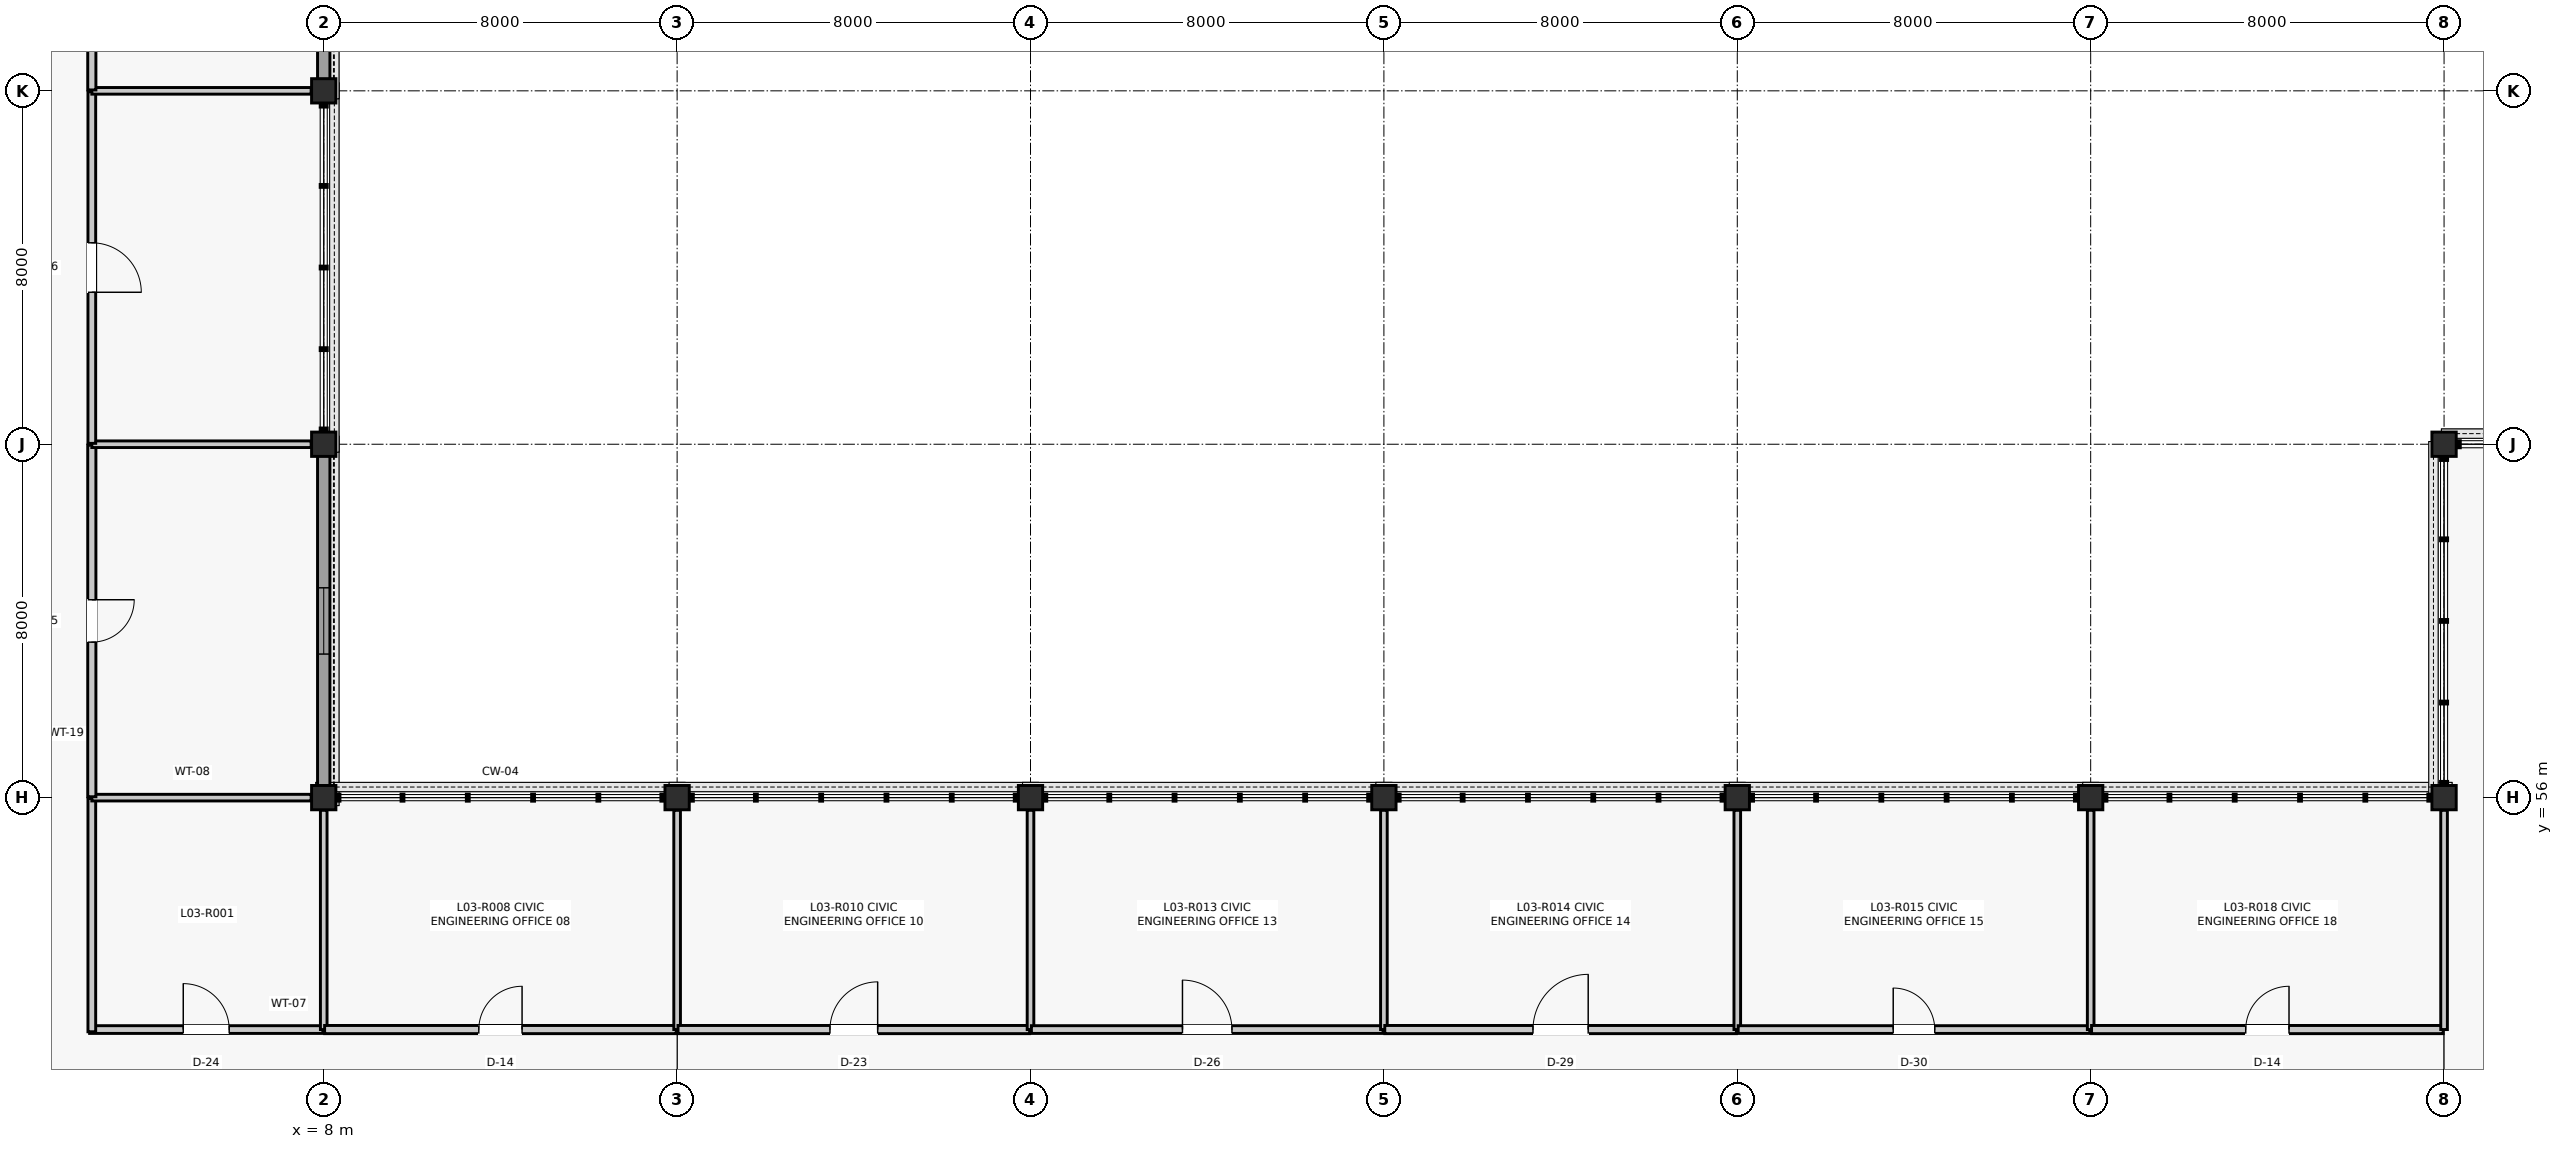
"""IFC4 building model, lengths in metres.
Left out: names, types, materials, properties, quantities, classifications, styles, units other than length and angle.
Written with IfcOpenShell. Run it as: python <this file> out.ifc"""

import sys

from ifc_helpers import new_model, si_unit, direction, frame, frame_2d, origin, origin_2d, place, context, subcontext, project, spatial, rectangle, extrude, element, fill, save


model = new_model("IFC4")
c1 = context("Model", 3, precision=1e-05, world=origin(), true_north=direction((0.0, 1.0)))
c2 = subcontext(c1, "Body", "Model", "MODEL_VIEW")
j1 = project(units=[si_unit("LENGTHUNIT", "METRE"), si_unit("PLANEANGLEUNIT", "RADIAN")], contexts=[c1])
p1 = place(None, origin())
s1 = spatial("IfcSite", under=j1, at=p1, CompositionType="ELEMENT")
p2 = place(p1, origin())
s2 = spatial("IfcBuilding", under=s1, at=p2, CompositionType="ELEMENT")
p3 = place(p2, frame((0.0, 0.0, 13.86)))
s3 = spatial("IfcBuildingStorey", under=s2, at=p3, CompositionType="ELEMENT", Elevation=13.86)
for number, where, z_axis, x_axis in (
    (1, (8.0, 56.0, 0.0), (0.0, 0.0, 1.0), (1.0, 0.0, 0.0)),
    (2, (8.0, 64.0, 0.0), (0.0, 0.0, 1.0), (1.0, 0.0, 0.0)),
    (3, (8.0, 72.0, 0.0), (0.0, 0.0, 1.0), (1.0, 0.0, 0.0)),
    (4, (16.0, 56.0, 0.0), (0.0, 0.0, 1.0), (1.0, 0.0, 0.0)),
    (5, (24.0, 56.0, 0.0), (0.0, 0.0, 1.0), (1.0, 0.0, 0.0)),
    (6, (32.0, 56.0, 0.0), (0.0, 0.0, 1.0), (1.0, 0.0, 0.0)),
    (7, (40.0, 56.0, 0.0), (0.0, 0.0, 1.0), (1.0, 0.0, 0.0)),
    (8, (48.0, 56.0, 0.0), (0.0, 0.0, 1.0), (1.0, 0.0, 0.0)),
    (9, (56.0, 56.0, 0.0), (0.0, 0.0, 1.0), (1.0, 0.0, 0.0)),
    (10, (56.0, 64.0, 0.0), (0.0, 0.0, 1.0), (1.0, 0.0, 0.0)),
):
    element("IfcColumn", number, at=place(p3, frame(where, z_axis=z_axis, x_axis=x_axis)), inside=s3, PredefinedType="COLUMN", context=c2, shape_type="SweptSolid", body=[
        extrude(rectangle(XDim=0.55, YDim=0.55, at=origin_2d()), origin(), (0.0, 0.0, 1.0), 3.96),
    ])
p4 = place(p3, frame((8.0, 56.26, 0.0), z_axis=(0.0, 0.0, 1.0), x_axis=(0.0, 1.0, 0.0)))
e11 = element("IfcWall", 11, at=p4, inside=s3, PredefinedType="SOLIDWALL", context=c2, shape_type="SweptSolid", body=[
    extrude(rectangle(XDim=7.48, YDim=0.28, at=frame_2d((3.74, 0.0))), origin(), (0.0, 0.0, 1.0), 3.367),
])
p5 = place(p4, frame((2.99, 0.0, 0.9)))
e12 = element("IfcOpeningElement", 12, at=p5, cuts=e11, PredefinedType="OPENING", context=c2, shape_type="SweptSolid", body=[
    extrude(rectangle(XDim=1.5, YDim=1.9, at=frame_2d((0.75, 0.95))), frame((0.0, 0.15, 0.0), z_axis=(0.0, -1.0, 0.0), x_axis=(1.0, 0.0, 0.0)), (0.0, 0.0, 1.0), 0.3),
])
p6 = place(p3, frame((8.0, 72.26, 0.0), z_axis=(0.0, 0.0, 1.0), x_axis=(0.0, 1.0, 0.0)))
e13 = element("IfcWall", 13, at=p6, inside=s3, PredefinedType="SOLIDWALL", context=c2, shape_type="SweptSolid", body=[
    extrude(rectangle(XDim=7.43, YDim=0.28, at=frame_2d((3.715, 0.0))), origin(), (0.0, 0.0, 1.0), 3.364),
])
p7 = place(p6, frame((3.115, 0.0, 0.9)))
e14 = element("IfcOpeningElement", 14, at=p7, cuts=e13, PredefinedType="OPENING", context=c2, shape_type="SweptSolid", body=[
    extrude(rectangle(XDim=1.2, YDim=1.8, at=frame_2d((0.6, 0.9))), frame((0.0, 0.15, 0.0), z_axis=(0.0, -1.0, 0.0), x_axis=(1.0, 0.0, 0.0)), (0.0, 0.0, 1.0), 0.3),
])
p8 = place(p3, frame((2.7, 50.75, 0.0), z_axis=(0.0, 0.0, 1.0), x_axis=(1.0, 0.0, 0.0)))
e15 = element("IfcWall", 15, at=p8, inside=s3, PredefinedType="PARTITIONING", context=c2, shape_type="SweptSolid", body=[
    extrude(rectangle(XDim=5.28, YDim=0.175, at=frame_2d((2.64, 0.0))), origin(), (0.0, 0.0, 1.0), 3.253),
])
p9 = place(p8, frame((2.12, 0.0, 0.0)))
e16 = element("IfcOpeningElement", 16, at=p9, cuts=e15, PredefinedType="OPENING", context=c2, shape_type="SweptSolid", body=[
    extrude(rectangle(XDim=1.04, YDim=2.18, at=frame_2d((0.52, 1.09))), frame((0.0, 0.097, 0.0), z_axis=(0.0, -1.0, 0.0), x_axis=(1.0, 0.0, 0.0)), (0.0, 0.0, 1.0), 0.195),
])
p10 = place(p3, frame((2.75, 50.7, 0.0), z_axis=(0.0, 0.0, 1.0), x_axis=(0.0, 1.0, 0.0)))
e17 = element("IfcWall", 17, at=p10, inside=s3, PredefinedType="PARTITIONING", context=c2, shape_type="SweptSolid", body=[
    extrude(rectangle(XDim=5.28, YDim=0.175, at=frame_2d((2.64, 0.0))), origin(), (0.0, 0.0, 1.0), 3.392),
])
p11 = place(p3, frame((2.75, 56.0, 0.0), z_axis=(0.0, 0.0, 1.0), x_axis=(1.0, 0.0, 0.0)))
e18 = element("IfcWall", 18, at=p11, inside=s3, PredefinedType="PARTITIONING", context=c2, shape_type="SweptSolid", body=[
    extrude(rectangle(XDim=4.965, YDim=0.15, at=frame_2d((2.482, 0.0))), origin(), (0.0, 0.0, 1.0), 3.452),
])
p12 = place(p3, frame((8.0, 50.75, 0.0), z_axis=(0.0, 0.0, 1.0), x_axis=(0.0, 1.0, 0.0)))
e19 = element("IfcWall", 19, at=p12, inside=s3, PredefinedType="PARTITIONING", context=c2, shape_type="SweptSolid", body=[
    extrude(rectangle(XDim=4.965, YDim=0.15, at=frame_2d((2.482, 0.0))), origin(), (0.0, 0.0, 1.0), 3.253),
])
p13 = place(p3, frame((2.75, 56.02, 0.0), z_axis=(0.0, 0.0, 1.0), x_axis=(0.0, 1.0, 0.0)))
e20 = element("IfcWall", 20, at=p13, inside=s3, PredefinedType="PARTITIONING", context=c2, shape_type="SweptSolid", body=[
    extrude(rectangle(XDim=7.96, YDim=0.185, at=frame_2d((3.98, 0.0))), origin(), (0.0, 0.0, 1.0), 3.247),
])
p14 = place(p13, frame((3.5, 0.0, 0.0)))
e21 = element("IfcOpeningElement", 21, at=p14, cuts=e20, PredefinedType="OPENING", context=c2, shape_type="SweptSolid", body=[
    extrude(rectangle(XDim=0.96, YDim=2.14, at=frame_2d((0.48, 1.07))), frame((0.0, 0.103, 0.0), z_axis=(0.0, -1.0, 0.0), x_axis=(1.0, 0.0, 0.0)), (0.0, 0.0, 1.0), 0.205),
])
p15 = place(p3, frame((2.75, 64.0, 0.0), z_axis=(0.0, 0.0, 1.0), x_axis=(1.0, 0.0, 0.0)))
e22 = element("IfcWall", 22, at=p15, inside=s3, PredefinedType="PARTITIONING", context=c2, shape_type="SweptSolid", body=[
    extrude(rectangle(XDim=4.965, YDim=0.15, at=frame_2d((2.482, 0.0))), origin(), (0.0, 0.0, 1.0), 3.247),
])
p16 = place(p3, frame((2.75, 64.02, 0.0), z_axis=(0.0, 0.0, 1.0), x_axis=(0.0, 1.0, 0.0)))
e23 = element("IfcWall", 23, at=p16, inside=s3, PredefinedType="PARTITIONING", context=c2, shape_type="SweptSolid", body=[
    extrude(rectangle(XDim=7.96, YDim=0.175, at=frame_2d((3.98, 0.0))), origin(), (0.0, 0.0, 1.0), 3.247),
])
p17 = place(p16, frame((3.42, 0.0, 0.0)))
e24 = element("IfcOpeningElement", 24, at=p17, cuts=e23, PredefinedType="OPENING", context=c2, shape_type="SweptSolid", body=[
    extrude(rectangle(XDim=1.12, YDim=2.22, at=frame_2d((0.56, 1.11))), frame((0.0, 0.097, 0.0), z_axis=(0.0, -1.0, 0.0), x_axis=(1.0, 0.0, 0.0)), (0.0, 0.0, 1.0), 0.195),
])
p18 = place(p3, frame((2.75, 72.0, 0.0), z_axis=(0.0, 0.0, 1.0), x_axis=(1.0, 0.0, 0.0)))
e25 = element("IfcWall", 25, at=p18, inside=s3, PredefinedType="PARTITIONING", context=c2, shape_type="SweptSolid", body=[
    extrude(rectangle(XDim=4.965, YDim=0.15, at=frame_2d((2.482, 0.0))), origin(), (0.0, 0.0, 1.0), 3.253),
])
p19 = place(p3, frame((2.75, 72.02, 0.0), z_axis=(0.0, 0.0, 1.0), x_axis=(0.0, 1.0, 0.0)))
e26 = element("IfcWall", 26, at=p19, inside=s3, PredefinedType="PARTITIONING", context=c2, shape_type="SweptSolid", body=[
    extrude(rectangle(XDim=7.96, YDim=0.185, at=frame_2d((3.98, 0.0))), origin(), (0.0, 0.0, 1.0), 3.241),
])
p20 = place(p19, frame((3.355, 0.0, 0.0)))
e27 = element("IfcOpeningElement", 27, at=p20, cuts=e26, PredefinedType="OPENING", context=c2, shape_type="SweptSolid", body=[
    extrude(rectangle(XDim=1.25, YDim=2.18, at=frame_2d((0.625, 1.09))), frame((0.0, 0.103, 0.0), z_axis=(0.0, -1.0, 0.0), x_axis=(1.0, 0.0, 0.0)), (0.0, 0.0, 1.0), 0.205),
])
p21 = place(p3, frame((8.02, 50.75, 0.0), z_axis=(0.0, 0.0, 1.0), x_axis=(1.0, 0.0, 0.0)))
e28 = element("IfcWall", 28, at=p21, inside=s3, PredefinedType="PARTITIONING", context=c2, shape_type="SweptSolid", body=[
    extrude(rectangle(XDim=7.96, YDim=0.185, at=frame_2d((3.98, 0.0))), origin(), (0.0, 0.0, 1.0), 3.253),
])
p22 = place(p21, frame((3.49, 0.0, 0.0)))
e29 = element("IfcOpeningElement", 29, at=p22, cuts=e28, PredefinedType="OPENING", context=c2, shape_type="SweptSolid", body=[
    extrude(rectangle(XDim=0.98, YDim=2.15, at=frame_2d((0.49, 1.075))), frame((0.0, 0.103, 0.0), z_axis=(0.0, -1.0, 0.0), x_axis=(1.0, 0.0, 0.0)), (0.0, 0.0, 1.0), 0.205),
])
p23 = place(p3, frame((16.0, 50.75, 0.0), z_axis=(0.0, 0.0, 1.0), x_axis=(0.0, 1.0, 0.0)))
e30 = element("IfcWall", 30, at=p23, inside=s3, PredefinedType="PARTITIONING", context=c2, shape_type="SweptSolid", body=[
    extrude(rectangle(XDim=4.965, YDim=0.15, at=frame_2d((2.482, 0.0))), origin(), (0.0, 0.0, 1.0), 3.452),
])
p24 = place(p3, frame((16.02, 50.75, 0.0), z_axis=(0.0, 0.0, 1.0), x_axis=(1.0, 0.0, 0.0)))
e31 = element("IfcWall", 31, at=p24, inside=s3, PredefinedType="PARTITIONING", context=c2, shape_type="SweptSolid", body=[
    extrude(rectangle(XDim=7.96, YDim=0.185, at=frame_2d((3.98, 0.0))), origin(), (0.0, 0.0, 1.0), 3.247),
])
p25 = place(p24, frame((3.44, 0.0, 0.0)))
e32 = element("IfcOpeningElement", 32, at=p25, cuts=e31, PredefinedType="OPENING", context=c2, shape_type="SweptSolid", body=[
    extrude(rectangle(XDim=1.08, YDim=2.2, at=frame_2d((0.54, 1.1))), frame((0.0, 0.103, 0.0), z_axis=(0.0, -1.0, 0.0), x_axis=(1.0, 0.0, 0.0)), (0.0, 0.0, 1.0), 0.205),
])
p26 = place(p3, frame((24.0, 50.75, 0.0), z_axis=(0.0, 0.0, 1.0), x_axis=(0.0, 1.0, 0.0)))
e33 = element("IfcWall", 33, at=p26, inside=s3, PredefinedType="PARTITIONING", context=c2, shape_type="SweptSolid", body=[
    extrude(rectangle(XDim=4.965, YDim=0.15, at=frame_2d((2.482, 0.0))), origin(), (0.0, 0.0, 1.0), 3.247),
])
p27 = place(p3, frame((24.02, 50.75, 0.0), z_axis=(0.0, 0.0, 1.0), x_axis=(1.0, 0.0, 0.0)))
e34 = element("IfcWall", 34, at=p27, inside=s3, PredefinedType="PARTITIONING", context=c2, shape_type="SweptSolid", body=[
    extrude(rectangle(XDim=7.96, YDim=0.175, at=frame_2d((3.98, 0.0))), origin(), (0.0, 0.0, 1.0), 3.247),
])
p28 = place(p27, frame((3.42, 0.0, 0.0)))
e35 = element("IfcOpeningElement", 35, at=p28, cuts=e34, PredefinedType="OPENING", context=c2, shape_type="SweptSolid", body=[
    extrude(rectangle(XDim=1.12, YDim=2.22, at=frame_2d((0.56, 1.11))), frame((0.0, 0.097, 0.0), z_axis=(0.0, -1.0, 0.0), x_axis=(1.0, 0.0, 0.0)), (0.0, 0.0, 1.0), 0.195),
])
p29 = place(p3, frame((32.0, 50.75, 0.0), z_axis=(0.0, 0.0, 1.0), x_axis=(0.0, 1.0, 0.0)))
e36 = element("IfcWall", 36, at=p29, inside=s3, PredefinedType="PARTITIONING", context=c2, shape_type="SweptSolid", body=[
    extrude(rectangle(XDim=4.965, YDim=0.15, at=frame_2d((2.482, 0.0))), origin(), (0.0, 0.0, 1.0), 3.253),
])
p30 = place(p3, frame((32.02, 50.75, 0.0), z_axis=(0.0, 0.0, 1.0), x_axis=(1.0, 0.0, 0.0)))
e37 = element("IfcWall", 37, at=p30, inside=s3, PredefinedType="PARTITIONING", context=c2, shape_type="SweptSolid", body=[
    extrude(rectangle(XDim=7.96, YDim=0.185, at=frame_2d((3.98, 0.0))), origin(), (0.0, 0.0, 1.0), 3.253),
])
p31 = place(p30, frame((3.355, 0.0, 0.0)))
e38 = element("IfcOpeningElement", 38, at=p31, cuts=e37, PredefinedType="OPENING", context=c2, shape_type="SweptSolid", body=[
    extrude(rectangle(XDim=1.25, YDim=2.18, at=frame_2d((0.625, 1.09))), frame((0.0, 0.103, 0.0), z_axis=(0.0, -1.0, 0.0), x_axis=(1.0, 0.0, 0.0)), (0.0, 0.0, 1.0), 0.205),
])
p32 = place(p3, frame((40.0, 50.75, 0.0), z_axis=(0.0, 0.0, 1.0), x_axis=(0.0, 1.0, 0.0)))
e39 = element("IfcWall", 39, at=p32, inside=s3, PredefinedType="PARTITIONING", context=c2, shape_type="SweptSolid", body=[
    extrude(rectangle(XDim=4.965, YDim=0.15, at=frame_2d((2.482, 0.0))), origin(), (0.0, 0.0, 1.0), 3.452),
])
p33 = place(p3, frame((40.02, 50.75, 0.0), z_axis=(0.0, 0.0, 1.0), x_axis=(1.0, 0.0, 0.0)))
e40 = element("IfcWall", 40, at=p33, inside=s3, PredefinedType="PARTITIONING", context=c2, shape_type="SweptSolid", body=[
    extrude(rectangle(XDim=7.96, YDim=0.175, at=frame_2d((3.98, 0.0))), origin(), (0.0, 0.0, 1.0), 3.247),
])
p34 = place(p33, frame((3.51, 0.0, 0.0)))
e41 = element("IfcOpeningElement", 41, at=p34, cuts=e40, PredefinedType="OPENING", context=c2, shape_type="SweptSolid", body=[
    extrude(rectangle(XDim=0.94, YDim=2.12, at=frame_2d((0.47, 1.06))), frame((0.0, 0.097, 0.0), z_axis=(0.0, -1.0, 0.0), x_axis=(1.0, 0.0, 0.0)), (0.0, 0.0, 1.0), 0.195),
])
p35 = place(p3, frame((48.0, 50.75, 0.0), z_axis=(0.0, 0.0, 1.0), x_axis=(0.0, 1.0, 0.0)))
e42 = element("IfcWall", 42, at=p35, inside=s3, PredefinedType="PARTITIONING", context=c2, shape_type="SweptSolid", body=[
    extrude(rectangle(XDim=4.965, YDim=0.15, at=frame_2d((2.482, 0.0))), origin(), (0.0, 0.0, 1.0), 3.247),
])
p36 = place(p3, frame((48.02, 50.75, 0.0), z_axis=(0.0, 0.0, 1.0), x_axis=(1.0, 0.0, 0.0)))
e43 = element("IfcWall", 43, at=p36, inside=s3, PredefinedType="PARTITIONING", context=c2, shape_type="SweptSolid", body=[
    extrude(rectangle(XDim=7.96, YDim=0.185, at=frame_2d((3.98, 0.0))), origin(), (0.0, 0.0, 1.0), 3.247),
])
p37 = place(p36, frame((3.49, 0.0, 0.0)))
e44 = element("IfcOpeningElement", 44, at=p37, cuts=e43, PredefinedType="OPENING", context=c2, shape_type="SweptSolid", body=[
    extrude(rectangle(XDim=0.98, YDim=2.15, at=frame_2d((0.49, 1.075))), frame((0.0, 0.103, 0.0), z_axis=(0.0, -1.0, 0.0), x_axis=(1.0, 0.0, 0.0)), (0.0, 0.0, 1.0), 0.205),
])
p38 = place(p3, frame((56.0, 50.75, 0.0), z_axis=(0.0, 0.0, 1.0), x_axis=(0.0, 1.0, 0.0)))
e45 = element("IfcWall", 45, at=p38, inside=s3, PredefinedType="PARTITIONING", context=c2, shape_type="SweptSolid", body=[
    extrude(rectangle(XDim=4.965, YDim=0.15, at=frame_2d((2.482, 0.0))), origin(), (0.0, 0.0, 1.0), 3.253),
])
p39 = place(p5, origin())
e46 = element("IfcWindow", 46, at=p39, inside=s3, PartitioningType="SINGLE_PANEL", PredefinedType="WINDOW", context=c2, shape_type="SweptSolid", body=[
    extrude(rectangle(XDim=1.5, YDim=1.9, at=frame_2d((0.75, 0.95))), frame((0.0, 0.03, 0.0), z_axis=(0.0, -1.0, 0.0), x_axis=(1.0, 0.0, 0.0)), (0.0, 0.0, 1.0), 0.06),
])
fill(e12, e46)
p40 = place(p9, origin())
e47 = element("IfcDoor", 47, at=p40, inside=s3, OperationType="SINGLE_SWING_LEFT", PredefinedType="DOOR", context=c2, shape_type="SweptSolid", body=[
    extrude(rectangle(XDim=1.04, YDim=2.18, at=frame_2d((0.52, 1.09))), frame((0.0, 0.025, 0.0), z_axis=(0.0, -1.0, 0.0), x_axis=(1.0, 0.0, 0.0)), (0.0, 0.0, 1.0), 0.05),
])
fill(e16, e47)
p41 = place(p14, frame((0.96, 0.0, 0.0), z_axis=(0.0, 0.0, 1.0), x_axis=(-1.0, 0.0, 0.0)))
e48 = element("IfcDoor", 48, at=p41, inside=s3, OperationType="SINGLE_SWING_RIGHT", PredefinedType="DOOR", context=c2, shape_type="SweptSolid", body=[
    extrude(rectangle(XDim=0.96, YDim=2.14, at=frame_2d((0.48, 1.07))), frame((0.0, 0.025, 0.0), z_axis=(0.0, -1.0, 0.0), x_axis=(1.0, 0.0, 0.0)), (0.0, 0.0, 1.0), 0.05),
])
fill(e21, e48)
p42 = place(p17, frame((1.12, 0.0, 0.0), z_axis=(0.0, 0.0, 1.0), x_axis=(-1.0, 0.0, 0.0)))
e49 = element("IfcDoor", 49, at=p42, inside=s3, OperationType="SINGLE_SWING_LEFT", PredefinedType="DOOR", context=c2, shape_type="SweptSolid", body=[
    extrude(rectangle(XDim=1.12, YDim=2.22, at=frame_2d((0.56, 1.11))), frame((0.0, 0.025, 0.0), z_axis=(0.0, -1.0, 0.0), x_axis=(1.0, 0.0, 0.0)), (0.0, 0.0, 1.0), 0.05),
])
fill(e24, e49)
p43 = place(p22, origin())
e50 = element("IfcDoor", 50, at=p43, inside=s3, OperationType="SINGLE_SWING_RIGHT", PredefinedType="DOOR", context=c2, shape_type="SweptSolid", body=[
    extrude(rectangle(XDim=0.98, YDim=2.15, at=frame_2d((0.49, 1.075))), frame((0.0, 0.025, 0.0), z_axis=(0.0, -1.0, 0.0), x_axis=(1.0, 0.0, 0.0)), (0.0, 0.0, 1.0), 0.05),
])
fill(e29, e50)
p44 = place(p25, origin())
e51 = element("IfcDoor", 51, at=p44, inside=s3, OperationType="SINGLE_SWING_RIGHT", PredefinedType="DOOR", context=c2, shape_type="SweptSolid", body=[
    extrude(rectangle(XDim=1.08, YDim=2.2, at=frame_2d((0.54, 1.1))), frame((0.0, 0.025, 0.0), z_axis=(0.0, -1.0, 0.0), x_axis=(1.0, 0.0, 0.0)), (0.0, 0.0, 1.0), 0.05),
])
fill(e32, e51)
p45 = place(p28, origin())
e52 = element("IfcDoor", 52, at=p45, inside=s3, OperationType="SINGLE_SWING_LEFT", PredefinedType="DOOR", context=c2, shape_type="SweptSolid", body=[
    extrude(rectangle(XDim=1.12, YDim=2.22, at=frame_2d((0.56, 1.11))), frame((0.0, 0.025, 0.0), z_axis=(0.0, -1.0, 0.0), x_axis=(1.0, 0.0, 0.0)), (0.0, 0.0, 1.0), 0.05),
])
fill(e35, e52)
p46 = place(p31, origin())
e53 = element("IfcDoor", 53, at=p46, inside=s3, OperationType="SINGLE_SWING_RIGHT", PredefinedType="DOOR", context=c2, shape_type="SweptSolid", body=[
    extrude(rectangle(XDim=1.25, YDim=2.18, at=frame_2d((0.625, 1.09))), frame((0.0, 0.025, 0.0), z_axis=(0.0, -1.0, 0.0), x_axis=(1.0, 0.0, 0.0)), (0.0, 0.0, 1.0), 0.05),
])
fill(e38, e53)
p47 = place(p34, origin())
e54 = element("IfcDoor", 54, at=p47, inside=s3, OperationType="SINGLE_SWING_LEFT", PredefinedType="DOOR", context=c2, shape_type="SweptSolid", body=[
    extrude(rectangle(XDim=0.94, YDim=2.12, at=frame_2d((0.47, 1.06))), frame((0.0, 0.025, 0.0), z_axis=(0.0, -1.0, 0.0), x_axis=(1.0, 0.0, 0.0)), (0.0, 0.0, 1.0), 0.05),
])
fill(e41, e54)
p48 = place(p37, origin())
e55 = element("IfcDoor", 55, at=p48, inside=s3, OperationType="SINGLE_SWING_RIGHT", PredefinedType="DOOR", context=c2, shape_type="SweptSolid", body=[
    extrude(rectangle(XDim=0.98, YDim=2.15, at=frame_2d((0.49, 1.075))), frame((0.0, 0.025, 0.0), z_axis=(0.0, -1.0, 0.0), x_axis=(1.0, 0.0, 0.0)), (0.0, 0.0, 1.0), 0.05),
])
fill(e44, e55)
save(model, sys.argv[1])
